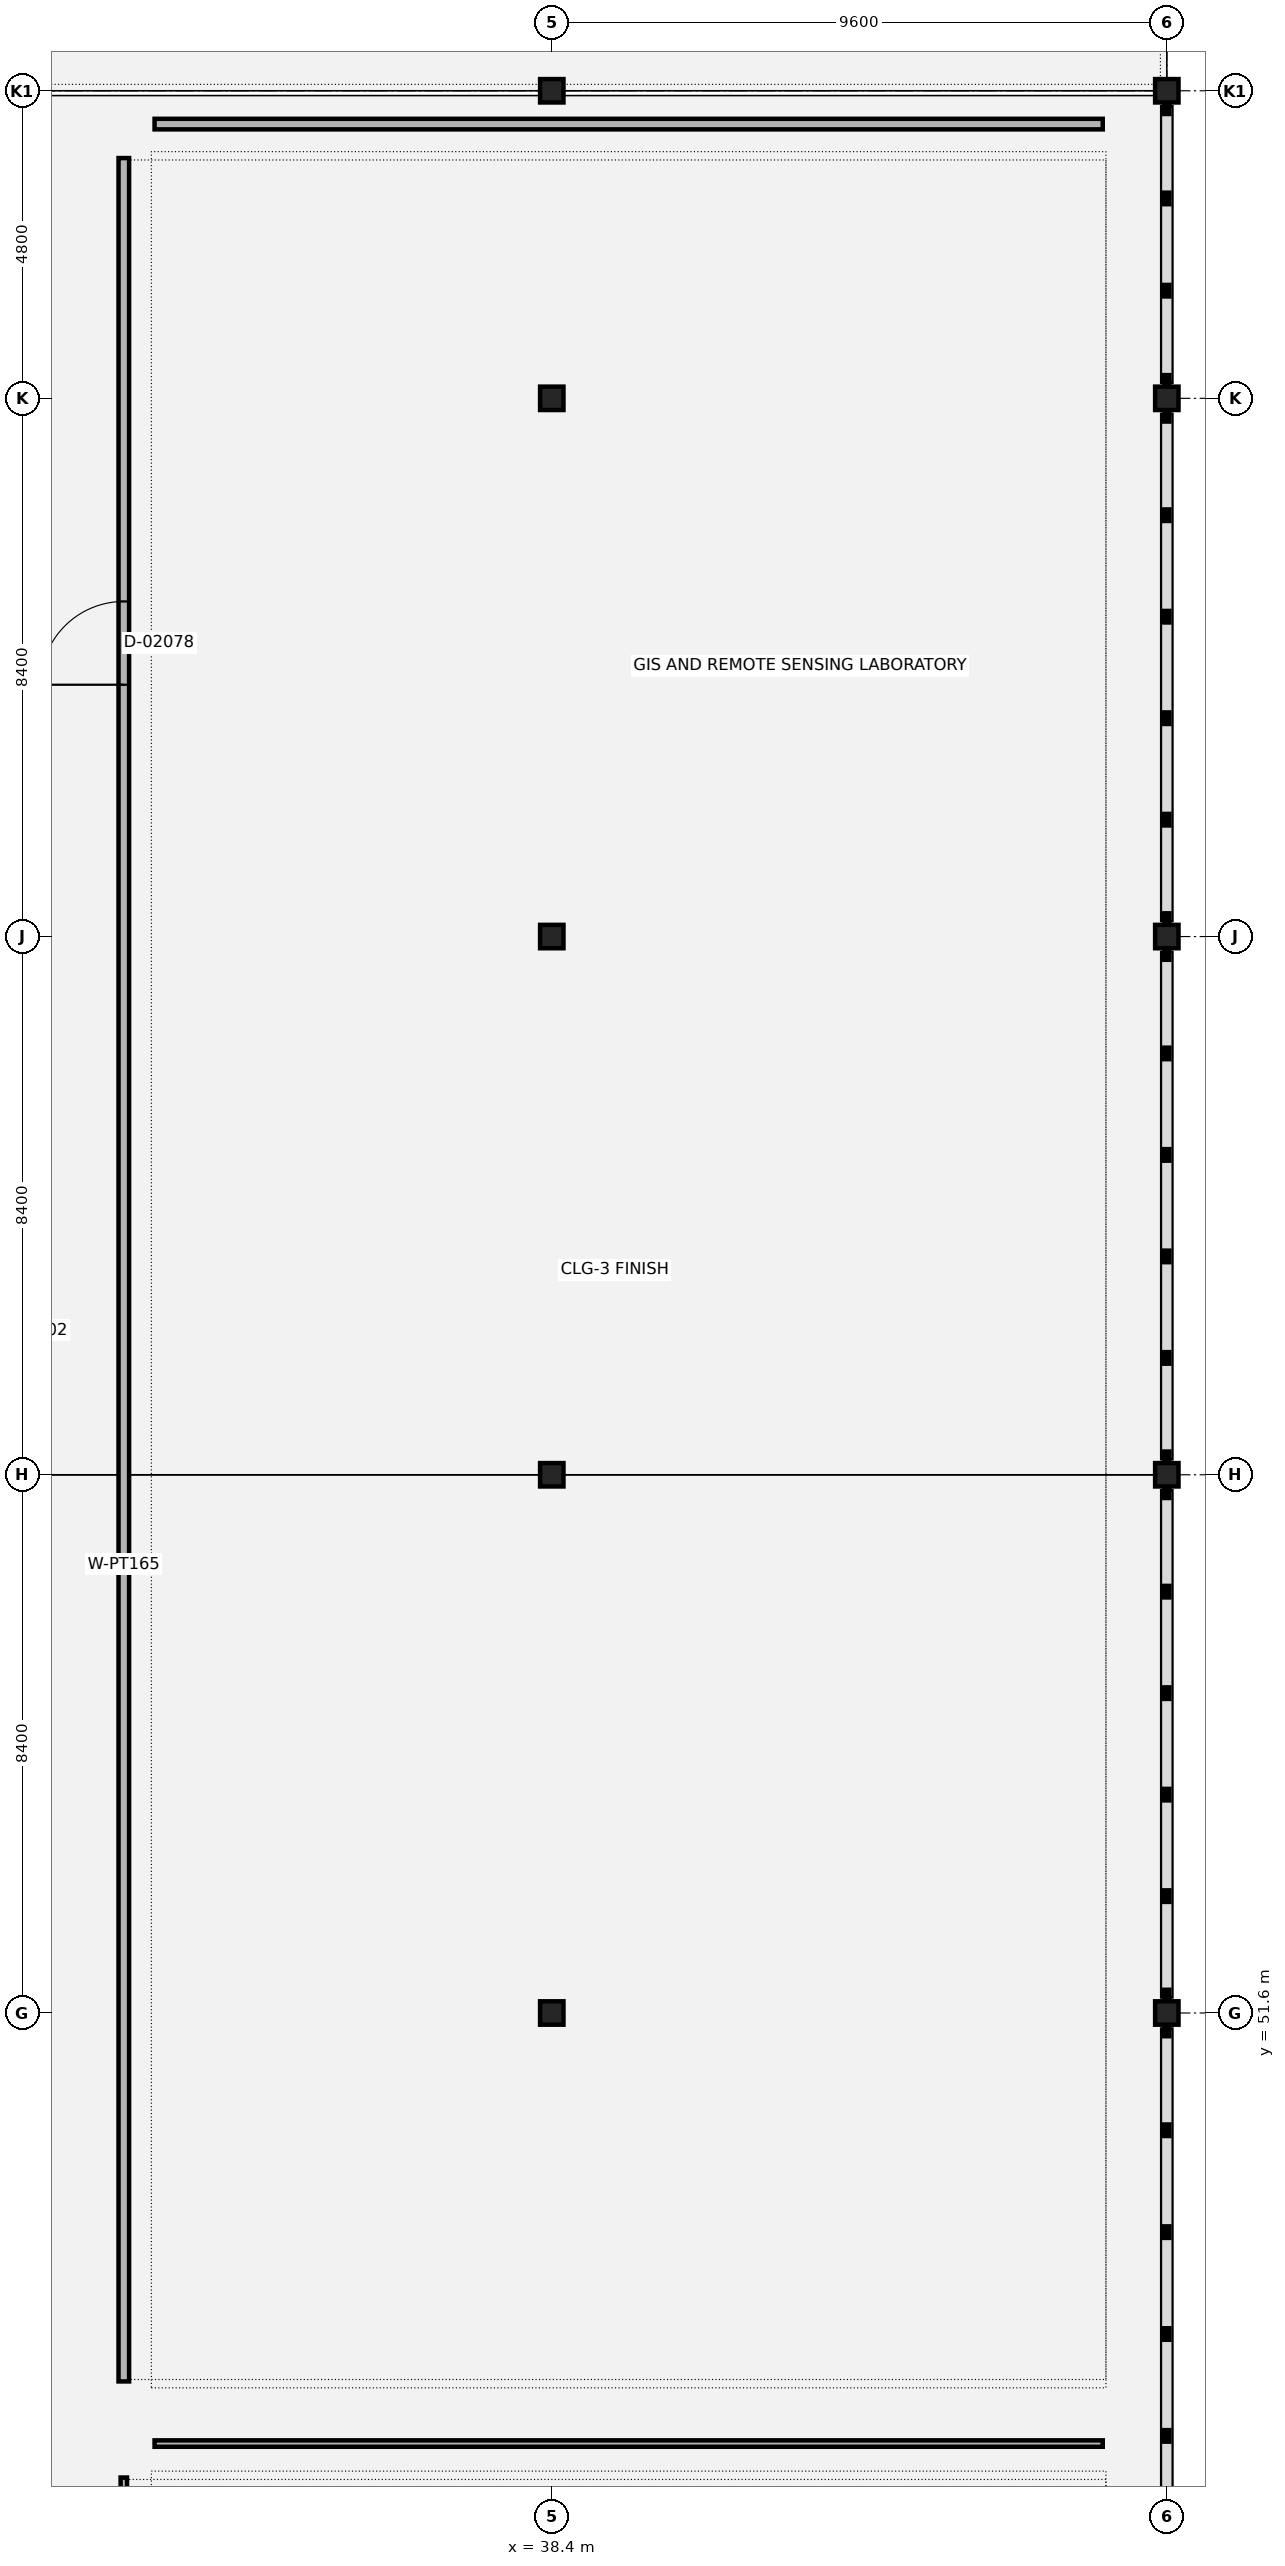
"""IFC4 building model, lengths in metres.
Left out: names, types, materials, properties, quantities, classifications, styles, units other than length and angle.
Written with IfcOpenShell. Run it as: python <this file> out.ifc"""

import sys

from ifc_helpers import new_model, si_unit, direction, frame, frame_2d, origin, origin_2d, place, context, subcontext, project, spatial, rectangle, extrude, element, fill, save


model = new_model("IFC4")
c1 = context("Model", 3, precision=1e-05, world=origin(), true_north=direction((0.0, 1.0)))
c2 = subcontext(c1, "Body", "Model", "MODEL_VIEW")
j1 = project(units=[si_unit("LENGTHUNIT", "METRE"), si_unit("PLANEANGLEUNIT", "RADIAN")], contexts=[c1])
p1 = place(None, origin())
s1 = spatial("IfcSite", under=j1, at=p1, CompositionType="ELEMENT")
p2 = place(p1, origin())
s2 = spatial("IfcBuilding", under=s1, at=p2, CompositionType="ELEMENT")
p3 = place(p2, frame((0.0, 0.0, 10.2)))
s3 = spatial("IfcBuildingStorey", under=s2, at=p3, CompositionType="ELEMENT", Elevation=10.2)
for number, where, z_axis, x_axis in (
    (1, (38.4, 51.6, 0.0), (0.0, 0.0, 1.0), (1.0, 0.0, 0.0)),
    (2, (38.4, 60.0, 0.0), (0.0, 0.0, 1.0), (1.0, 0.0, 0.0)),
    (3, (38.4, 68.4, 0.0), (0.0, 0.0, 1.0), (1.0, 0.0, 0.0)),
    (4, (38.4, 76.8, 0.0), (0.0, 0.0, 1.0), (1.0, 0.0, 0.0)),
    (5, (38.4, 81.6, 0.0), (0.0, 0.0, 1.0), (1.0, 0.0, 0.0)),
    (6, (48.0, 51.6, 0.0), (0.0, 0.0, 1.0), (1.0, 0.0, 0.0)),
    (7, (48.0, 60.0, 0.0), (0.0, 0.0, 1.0), (1.0, 0.0, 0.0)),
    (8, (48.0, 68.4, 0.0), (0.0, 0.0, 1.0), (1.0, 0.0, 0.0)),
    (9, (48.0, 76.8, 0.0), (0.0, 0.0, 1.0), (1.0, 0.0, 0.0)),
    (10, (48.0, 81.6, 0.0), (0.0, 0.0, 1.0), (1.0, 0.0, 0.0)),
):
    element("IfcColumn", number, at=place(p3, frame(where, z_axis=z_axis, x_axis=x_axis)), inside=s3, PredefinedType="COLUMN", context=c2, shape_type="SweptSolid", body=[
        extrude(rectangle(XDim=0.365, YDim=0.365, at=origin_2d()), origin(), (0.0, 0.0, 1.0), 4.2),
    ])
p4 = place(p3, frame((31.72, 14.25, 0.0), z_axis=(0.0, 0.0, 1.0), x_axis=(0.0, 1.0, 0.0)))
e11 = element("IfcWall", 11, at=p4, inside=s3, PredefinedType="MOVABLE", context=c2, shape_type="SweptSolid", body=[
    extrude(rectangle(XDim=30.1, YDim=0.1, at=frame_2d((15.05, 0.0))), origin(), (0.0, 0.0, 1.0), 3.03),
])
p5 = place(p4, frame((18.717, 0.0, 0.0)))
e12 = element("IfcOpeningElement", 12, at=p5, cuts=e11, PredefinedType="OPENING", context=c2, shape_type="SweptSolid", body=[
    extrude(rectangle(XDim=1.12, YDim=2.15, at=frame_2d((0.56, 1.075))), frame((0.0, 0.06, 0.0), z_axis=(0.0, -1.0, 0.0), x_axis=(1.0, 0.0, 0.0)), (0.0, 0.0, 1.0), 0.12),
])
p6 = place(p3, frame((32.2, 44.88, 0.0), z_axis=(0.0, 0.0, 1.0), x_axis=(1.0, 0.0, 0.0)))
e13 = element("IfcWall", 13, at=p6, inside=s3, PredefinedType="MOVABLE", context=c2, shape_type="SweptSolid", body=[
    extrude(rectangle(XDim=14.8, YDim=0.1, at=frame_2d((7.4, 0.0))), origin(), (0.0, 0.0, 1.0), 3.03),
])
p7 = place(p3, frame((31.72, 45.85, 0.0), z_axis=(0.0, 0.0, 1.0), x_axis=(0.0, 1.0, 0.0)))
e14 = element("IfcWall", 14, at=p7, inside=s3, PredefinedType="PARTITIONING", context=c2, shape_type="SweptSolid", body=[
    extrude(rectangle(XDim=34.7, YDim=0.165, at=frame_2d((17.35, 0.0))), origin(), (0.0, 0.0, 1.0), 3.03),
])
p8 = place(p7, frame((26.48, 0.0, 0.0)))
e15 = element("IfcOpeningElement", 15, at=p8, cuts=e14, PredefinedType="OPENING", context=c2, shape_type="SweptSolid", body=[
    extrude(rectangle(XDim=1.3, YDim=2.15, at=frame_2d((0.65, 1.075))), frame((0.0, 0.093, 0.0), z_axis=(0.0, -1.0, 0.0), x_axis=(1.0, 0.0, 0.0)), (0.0, 0.0, 1.0), 0.185),
])
p9 = place(p3, frame((32.2, 81.08, 0.0), z_axis=(0.0, 0.0, 1.0), x_axis=(1.0, 0.0, 0.0)))
e16 = element("IfcWall", 16, at=p9, inside=s3, PredefinedType="PARTITIONING", context=c2, shape_type="SweptSolid", body=[
    extrude(rectangle(XDim=14.8, YDim=0.165, at=frame_2d((7.4, 0.0))), origin(), (0.0, 0.0, 1.0), 3.03),
])
p10 = place(p8, origin())
e17 = element("IfcDoor", 17, at=p10, inside=s3, OperationType="SINGLE_SWING_LEFT", PredefinedType="DOOR", context=c2, shape_type="SweptSolid", body=[
    extrude(rectangle(XDim=1.3, YDim=2.15, at=frame_2d((0.65, 1.075))), frame((0.0, 0.025, 0.0), z_axis=(0.0, -1.0, 0.0), x_axis=(1.0, 0.0, 0.0)), (0.0, 0.0, 1.0), 0.05),
])
fill(e15, e17)
save(model, sys.argv[1])
